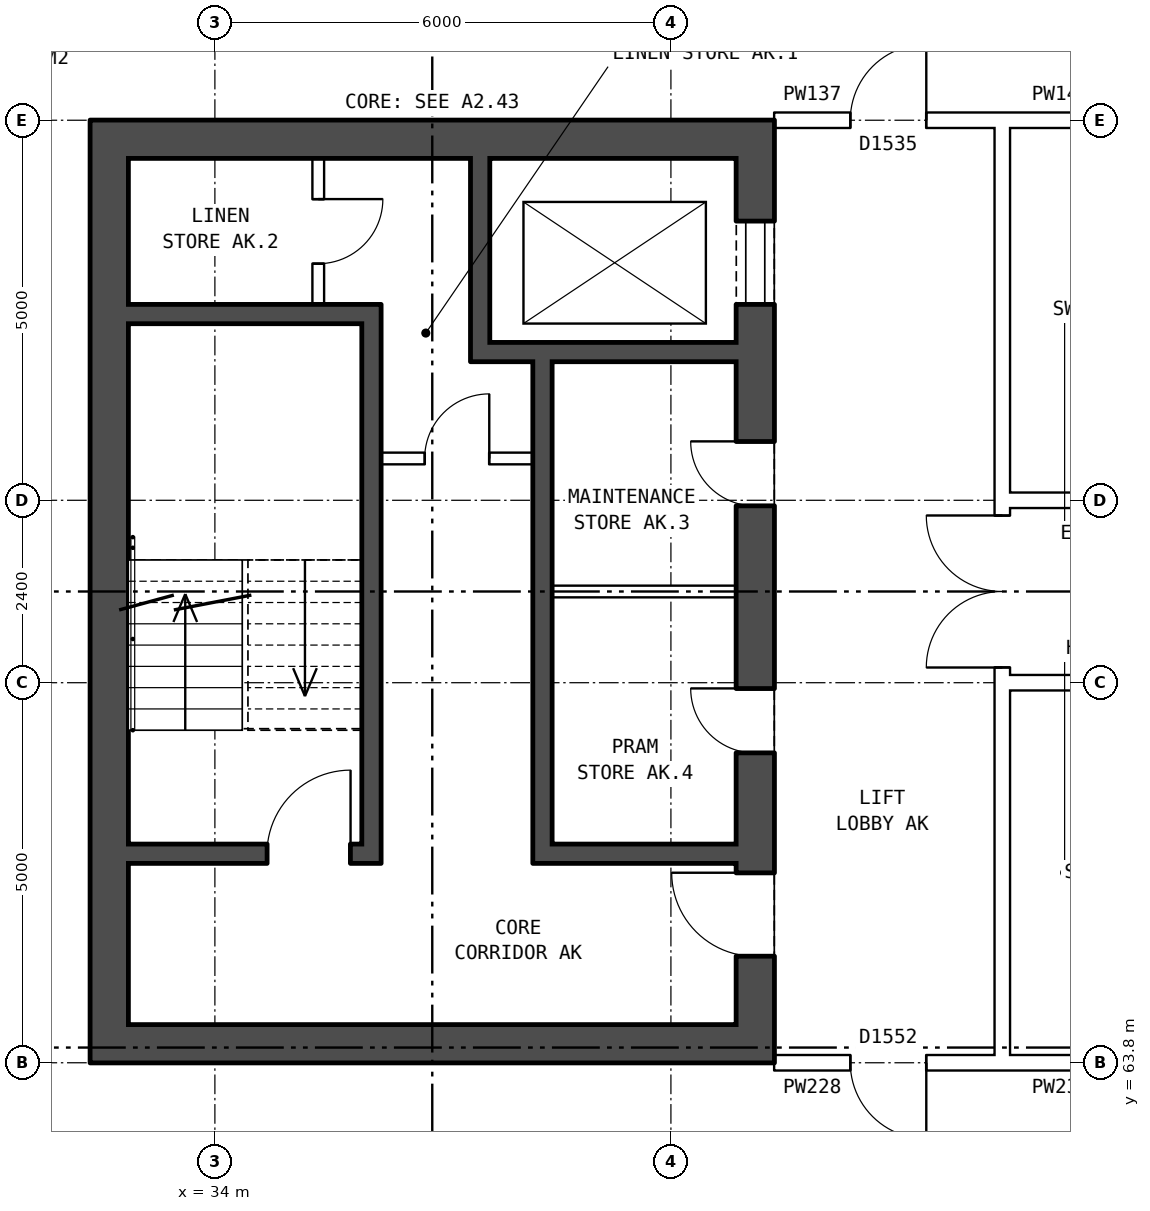
"""IFC4 building model, lengths in metres.
Left out: names, types, materials, properties, quantities, classifications, styles, units other than length and angle.
Written with IfcOpenShell. Run it as: python <this file> out.ifc"""

import sys

from ifc_helpers import new_model, si_unit, direction, frame, frame_2d, origin, place, context, subcontext, project, spatial, rectangle, extrude, element, fill, save


model = new_model("IFC4")
c1 = context("Model", 3, precision=1e-05, world=origin(), true_north=direction((0.0, 1.0)))
c2 = subcontext(c1, "Body", "Model", "MODEL_VIEW")
j1 = project(units=[si_unit("LENGTHUNIT", "METRE"), si_unit("PLANEANGLEUNIT", "RADIAN")], contexts=[c1])
p1 = place(None, origin())
s1 = spatial("IfcSite", under=j1, at=p1, CompositionType="ELEMENT")
p2 = place(p1, origin())
s2 = spatial("IfcBuilding", under=s1, at=p2, CompositionType="ELEMENT")
p3 = place(p2, frame((0.0, 0.0, 151.6)))
s3 = spatial("IfcBuildingStorey", under=s2, at=p3, CompositionType="ELEMENT", Elevation=151.6)
p4 = place(p3, frame((41.11, 76.2, 0.0), z_axis=(0.0, 0.0, 1.0), x_axis=(0.0, -1.0, 0.0)))
e1 = element("IfcWall", 1, at=p4, inside=s3, PredefinedType="SHEAR", context=c2, shape_type="SweptSolid", body=[
    extrude(rectangle(XDim=12.4, YDim=0.5, at=frame_2d((6.2, 0.0))), origin(), (0.0, 0.0, 1.0), 2.85),
])
p5 = place(p4, frame((1.325, 0.0, 0.0)))
e2 = element("IfcOpeningElement", 2, at=p5, cuts=e1, PredefinedType="OPENING", context=c2, shape_type="SweptSolid", body=[
    extrude(rectangle(XDim=1.1, YDim=2.1, at=frame_2d((0.55, 1.05))), frame((0.0, 0.26, 0.0), z_axis=(0.0, -1.0, 0.0), x_axis=(1.0, 0.0, 0.0)), (0.0, 0.0, 1.0), 0.52),
])
p6 = place(p4, frame((4.225, 0.0, 0.0)))
e3 = element("IfcOpeningElement", 3, at=p6, cuts=e1, PredefinedType="OPENING", context=c2, shape_type="SweptSolid", body=[
    extrude(rectangle(XDim=0.85, YDim=2.1, at=frame_2d((0.425, 1.05))), frame((0.0, 0.26, 0.0), z_axis=(0.0, -1.0, 0.0), x_axis=(1.0, 0.0, 0.0)), (0.0, 0.0, 1.0), 0.52),
])
p7 = place(p4, frame((7.475, 0.0, 0.0)))
e4 = element("IfcOpeningElement", 4, at=p7, cuts=e1, PredefinedType="OPENING", context=c2, shape_type="SweptSolid", body=[
    extrude(rectangle(XDim=0.85, YDim=2.1, at=frame_2d((0.425, 1.05))), frame((0.0, 0.26, 0.0), z_axis=(0.0, -1.0, 0.0), x_axis=(1.0, 0.0, 0.0)), (0.0, 0.0, 1.0), 0.52),
])
p8 = place(p4, frame((9.9, 0.0, 0.0)))
e5 = element("IfcOpeningElement", 5, at=p8, cuts=e1, PredefinedType="OPENING", context=c2, shape_type="SweptSolid", body=[
    extrude(rectangle(XDim=1.1, YDim=2.1, at=frame_2d((0.55, 1.05))), frame((0.0, 0.26, 0.0), z_axis=(0.0, -1.0, 0.0), x_axis=(1.0, 0.0, 0.0)), (0.0, 0.0, 1.0), 0.52),
])
p9 = place(p3, frame((32.61, 76.2, 0.0), z_axis=(0.0, 0.0, 1.0), x_axis=(0.0, -1.0, 0.0)))
e6 = element("IfcWall", 6, at=p9, inside=s3, PredefinedType="SHEAR", context=c2, shape_type="SweptSolid", body=[
    extrude(rectangle(XDim=12.4, YDim=0.5, at=frame_2d((6.2, 0.0))), origin(), (0.0, 0.0, 1.0), 2.85),
])
for number, where, z_axis, x_axis in (
    (7, (40.86, 75.95, 0.0), (0.0, 0.0, 1.0), (-1.0, 0.0, 0.0)),
    (8, (40.86, 64.05, 0.0), (0.0, 0.0, 1.0), (-1.0, 0.0, 0.0)),
):
    element("IfcWall", number, at=place(p3, frame(where, z_axis=z_axis, x_axis=x_axis)), inside=s3, PredefinedType="SHEAR", context=c2, shape_type="SweptSolid", body=[
        extrude(rectangle(XDim=8.0, YDim=0.5, at=frame_2d((4.0, 0.0))), origin(), (0.0, 0.0, 1.0), 2.85),
    ])
p10 = place(p3, frame((35.935, 73.65, 0.0), z_axis=(0.0, 0.0, 1.0), x_axis=(-1.0, 0.0, 0.0)))
e9 = element("IfcWall", 9, at=p10, inside=s3, PredefinedType="SHEAR", context=c2, shape_type="SweptSolid", body=[
    extrude(rectangle(XDim=3.075, YDim=0.25, at=frame_2d((1.538, 0.0))), origin(), (0.0, 0.0, 1.0), 2.85),
])
p11 = place(p3, frame((40.86, 73.15, 0.0), z_axis=(0.0, 0.0, 1.0), x_axis=(-1.0, 0.0, 0.0)))
e10 = element("IfcWall", 10, at=p11, inside=s3, PredefinedType="SHEAR", context=c2, shape_type="SweptSolid", body=[
    extrude(rectangle(XDim=3.495, YDim=0.25, at=frame_2d((1.748, 0.0))), origin(), (0.0, 0.0, 1.0), 2.85),
])
p12 = place(p3, frame((38.185, 71.75, 0.0), z_axis=(0.0, 0.0, 1.0), x_axis=(-1.0, 0.0, 0.0)))
e11 = element("IfcWall", 11, at=p12, inside=s3, PredefinedType="PARTITIONING", context=c2, shape_type="SweptSolid", body=[
    extrude(rectangle(XDim=2.0, YDim=0.15, at=frame_2d((1.0, 0.0))), origin(), (0.0, 0.0, 1.0), 2.85),
])
p13 = place(p12, frame((0.575, 0.0, 0.0)))
e12 = element("IfcOpeningElement", 12, at=p13, cuts=e11, PredefinedType="OPENING", context=c2, shape_type="SweptSolid", body=[
    extrude(rectangle(XDim=0.85, YDim=2.1, at=frame_2d((0.425, 1.05))), frame((0.0, 0.085, 0.0), z_axis=(0.0, -1.0, 0.0), x_axis=(1.0, 0.0, 0.0)), (0.0, 0.0, 1.0), 0.17),
])
p14 = place(p3, frame((40.86, 70.0, 0.0), z_axis=(0.0, 0.0, 1.0), x_axis=(-1.0, 0.0, 0.0)))
e13 = element("IfcWall", 13, at=p14, inside=s3, PredefinedType="PARTITIONING", context=c2, shape_type="SweptSolid", body=[
    extrude(rectangle(XDim=2.425, YDim=0.15, at=frame_2d((1.212, 0.0))), origin(), (0.0, 0.0, 1.0), 2.85),
])
p15 = place(p3, frame((40.86, 66.55, 0.0), z_axis=(0.0, 0.0, 1.0), x_axis=(-1.0, 0.0, 0.0)))
e14 = element("IfcWall", 14, at=p15, inside=s3, PredefinedType="SHEAR", context=c2, shape_type="SweptSolid", body=[
    extrude(rectangle(XDim=2.425, YDim=0.25, at=frame_2d((1.212, 0.0))), origin(), (0.0, 0.0, 1.0), 2.85),
])
p16 = place(p3, frame((35.935, 66.55, 0.0), z_axis=(0.0, 0.0, 1.0), x_axis=(-1.0, 0.0, 0.0)))
e15 = element("IfcWall", 15, at=p16, inside=s3, PredefinedType="SHEAR", context=c2, shape_type="SweptSolid", body=[
    extrude(rectangle(XDim=3.075, YDim=0.25, at=frame_2d((1.538, 0.0))), origin(), (0.0, 0.0, 1.0), 2.85),
])
p17 = place(p16, frame((0.15, 0.0, 0.0)))
e16 = element("IfcOpeningElement", 16, at=p17, cuts=e15, PredefinedType="OPENING", context=c2, shape_type="SweptSolid", body=[
    extrude(rectangle(XDim=1.1, YDim=2.1, at=frame_2d((0.55, 1.05))), frame((0.0, 0.135, 0.0), z_axis=(0.0, -1.0, 0.0), x_axis=(1.0, 0.0, 0.0)), (0.0, 0.0, 1.0), 0.27),
])
p18 = place(p3, frame((38.31, 73.025, 0.0), z_axis=(0.0, 0.0, 1.0), x_axis=(0.0, -1.0, 0.0)))
e17 = element("IfcWall", 17, at=p18, inside=s3, PredefinedType="SHEAR", context=c2, shape_type="SweptSolid", body=[
    extrude(rectangle(XDim=6.6, YDim=0.25, at=frame_2d((3.3, 0.0))), origin(), (0.0, 0.0, 1.0), 2.85),
])
p19 = place(p3, frame((37.49, 75.7, 0.0), z_axis=(0.0, 0.0, 1.0), x_axis=(0.0, -1.0, 0.0)))
e18 = element("IfcWall", 18, at=p19, inside=s3, PredefinedType="SHEAR", context=c2, shape_type="SweptSolid", body=[
    extrude(rectangle(XDim=2.425, YDim=0.25, at=frame_2d((1.212, 0.0))), origin(), (0.0, 0.0, 1.0), 2.85),
])
p20 = place(p3, frame((36.06, 73.775, 0.0), z_axis=(0.0, 0.0, 1.0), x_axis=(0.0, -1.0, 0.0)))
e19 = element("IfcWall", 19, at=p20, inside=s3, PredefinedType="SHEAR", context=c2, shape_type="SweptSolid", body=[
    extrude(rectangle(XDim=7.35, YDim=0.25, at=frame_2d((3.675, 0.0))), origin(), (0.0, 0.0, 1.0), 2.85),
])
p21 = place(p3, frame((35.36, 75.7, 0.0), z_axis=(0.0, 0.0, 1.0), x_axis=(0.0, -1.0, 0.0)))
e20 = element("IfcWall", 20, at=p21, inside=s3, PredefinedType="PARTITIONING", context=c2, shape_type="SweptSolid", body=[
    extrude(rectangle(XDim=1.925, YDim=0.15, at=frame_2d((0.962, 0.0))), origin(), (0.0, 0.0, 1.0), 2.85),
])
p22 = place(p21, frame((0.538, 0.0, 0.0)))
e21 = element("IfcOpeningElement", 21, at=p22, cuts=e20, PredefinedType="OPENING", context=c2, shape_type="SweptSolid", body=[
    extrude(rectangle(XDim=0.85, YDim=2.1, at=frame_2d((0.425, 1.05))), frame((0.0, 0.085, 0.0), z_axis=(0.0, -1.0, 0.0), x_axis=(1.0, 0.0, 0.0)), (0.0, 0.0, 1.0), 0.17),
])
p23 = place(p3, frame((44.36, 63.9, 0.0), z_axis=(0.0, 0.0, 1.0), x_axis=(0.0, 1.0, 0.0)))
e22 = element("IfcWall", 22, at=p23, inside=s3, PredefinedType="PARTITIONING", context=c2, shape_type="SweptSolid", body=[
    extrude(rectangle(XDim=12.2, YDim=0.2, at=frame_2d((6.1, 0.0))), origin(), (0.0, 0.0, 1.0), 2.85),
])
p24 = place(p23, frame((5.1, 0.0, 0.0)))
e23 = element("IfcOpeningElement", 23, at=p24, cuts=e22, PredefinedType="OPENING", context=c2, shape_type="SweptSolid", body=[
    extrude(rectangle(XDim=2.0, YDim=2.1, at=frame_2d((1.0, 1.05))), frame((0.0, 0.11, 0.0), z_axis=(0.0, -1.0, 0.0), x_axis=(1.0, 0.0, 0.0)), (0.0, 0.0, 1.0), 0.22),
])
p25 = place(p3, frame((41.36, 63.8, 0.0), z_axis=(0.0, 0.0, 1.0), x_axis=(1.0, 0.0, 0.0)))
e24 = element("IfcWall", 24, at=p25, inside=s3, PredefinedType="PARTITIONING", context=c2, shape_type="SweptSolid", body=[
    extrude(rectangle(XDim=3.0, YDim=0.2, at=frame_2d((1.5, 0.0))), origin(), (0.0, 0.0, 1.0), 2.85),
])
p26 = place(p25, frame((1.0, 0.0, 0.0)))
e25 = element("IfcOpeningElement", 25, at=p26, cuts=e24, PredefinedType="OPENING", context=c2, shape_type="SweptSolid", body=[
    extrude(rectangle(XDim=1.0, YDim=2.1, at=frame_2d((0.5, 1.05))), frame((0.0, 0.11, 0.0), z_axis=(0.0, -1.0, 0.0), x_axis=(1.0, 0.0, 0.0)), (0.0, 0.0, 1.0), 0.22),
])
p27 = place(p3, frame((44.36, 63.8, 0.0), z_axis=(0.0, 0.0, 1.0), x_axis=(1.0, 0.0, 0.0)))
e26 = element("IfcWall", 26, at=p27, inside=s3, PredefinedType="PARTITIONING", context=c2, shape_type="SweptSolid", body=[
    extrude(rectangle(XDim=1.54, YDim=0.2, at=frame_2d((0.77, 0.0))), origin(), (0.0, 0.0, 1.0), 2.85),
])
p28 = place(p3, frame((44.36, 68.8, 0.0), z_axis=(0.0, 0.0, 1.0), x_axis=(1.0, 0.0, 0.0)))
e27 = element("IfcWall", 27, at=p28, inside=s3, PredefinedType="PARTITIONING", context=c2, shape_type="SweptSolid", body=[
    extrude(rectangle(XDim=19.28, YDim=0.2, at=frame_2d((9.64, 0.0))), origin(), (0.0, 0.0, 1.0), 2.85),
])
p29 = place(p28, frame((14.64, 0.0, 0.0)))
e28 = element("IfcOpeningElement", 28, at=p29, cuts=e27, PredefinedType="OPENING", context=c2, shape_type="SweptSolid", body=[
    extrude(rectangle(XDim=1.0, YDim=2.1, at=frame_2d((0.5, 1.05))), frame((0.0, 0.11, 0.0), z_axis=(0.0, -1.0, 0.0), x_axis=(1.0, 0.0, 0.0)), (0.0, 0.0, 1.0), 0.22),
])
p30 = place(p28, frame((5.64, 0.0, 0.0)))
e29 = element("IfcOpeningElement", 29, at=p30, cuts=e27, PredefinedType="OPENING", context=c2, shape_type="SweptSolid", body=[
    extrude(rectangle(XDim=1.0, YDim=2.1, at=frame_2d((0.5, 1.05))), frame((0.0, 0.11, 0.0), z_axis=(0.0, -1.0, 0.0), x_axis=(1.0, 0.0, 0.0)), (0.0, 0.0, 1.0), 0.22),
])
p31 = place(p3, frame((44.36, 71.2, 0.0), z_axis=(0.0, 0.0, 1.0), x_axis=(1.0, 0.0, 0.0)))
e30 = element("IfcWall", 30, at=p31, inside=s3, PredefinedType="PARTITIONING", context=c2, shape_type="SweptSolid", body=[
    extrude(rectangle(XDim=19.28, YDim=0.2, at=frame_2d((9.64, 0.0))), origin(), (0.0, 0.0, 1.0), 2.85),
])
p32 = place(p31, frame((14.64, 0.0, 0.0)))
e31 = element("IfcOpeningElement", 31, at=p32, cuts=e30, PredefinedType="OPENING", context=c2, shape_type="SweptSolid", body=[
    extrude(rectangle(XDim=1.0, YDim=2.1, at=frame_2d((0.5, 1.05))), frame((0.0, 0.11, 0.0), z_axis=(0.0, -1.0, 0.0), x_axis=(1.0, 0.0, 0.0)), (0.0, 0.0, 1.0), 0.22),
])
p33 = place(p31, frame((5.64, 0.0, 0.0)))
e32 = element("IfcOpeningElement", 32, at=p33, cuts=e30, PredefinedType="OPENING", context=c2, shape_type="SweptSolid", body=[
    extrude(rectangle(XDim=1.0, YDim=2.1, at=frame_2d((0.5, 1.05))), frame((0.0, 0.11, 0.0), z_axis=(0.0, -1.0, 0.0), x_axis=(1.0, 0.0, 0.0)), (0.0, 0.0, 1.0), 0.22),
])
p34 = place(p3, frame((41.36, 76.2, 0.0), z_axis=(0.0, 0.0, 1.0), x_axis=(1.0, 0.0, 0.0)))
e33 = element("IfcWall", 33, at=p34, inside=s3, PredefinedType="PARTITIONING", context=c2, shape_type="SweptSolid", body=[
    extrude(rectangle(XDim=3.0, YDim=0.2, at=frame_2d((1.5, 0.0))), origin(), (0.0, 0.0, 1.0), 2.85),
])
p35 = place(p34, frame((1.0, 0.0, 0.0)))
e34 = element("IfcOpeningElement", 34, at=p35, cuts=e33, PredefinedType="OPENING", context=c2, shape_type="SweptSolid", body=[
    extrude(rectangle(XDim=1.0, YDim=2.1, at=frame_2d((0.5, 1.05))), frame((0.0, 0.11, 0.0), z_axis=(0.0, -1.0, 0.0), x_axis=(1.0, 0.0, 0.0)), (0.0, 0.0, 1.0), 0.22),
])
p36 = place(p3, frame((44.36, 76.2, 0.0), z_axis=(0.0, 0.0, 1.0), x_axis=(1.0, 0.0, 0.0)))
e35 = element("IfcWall", 35, at=p36, inside=s3, PredefinedType="PARTITIONING", context=c2, shape_type="SweptSolid", body=[
    extrude(rectangle(XDim=1.54, YDim=0.2, at=frame_2d((0.77, 0.0))), origin(), (0.0, 0.0, 1.0), 2.85),
])
p37 = place(p5, origin())
e36 = element("IfcDoor", 36, at=p37, inside=s3, OperationType="DOUBLE_DOOR_SLIDING", PredefinedType="DOOR", context=c2, shape_type="SweptSolid", body=[
    extrude(rectangle(XDim=1.1, YDim=2.1, at=frame_2d((0.55, 1.05))), frame((0.0, -0.185, 0.0), z_axis=(0.0, -1.0, 0.0), x_axis=(1.0, 0.0, 0.0)), (0.0, 0.0, 1.0), 0.05),
])
fill(e2, e36)
p38 = place(p6, frame((0.85, 0.0, 0.0), z_axis=(0.0, 0.0, 1.0), x_axis=(-1.0, 0.0, 0.0)))
e37 = element("IfcDoor", 37, at=p38, inside=s3, OperationType="SINGLE_SWING_RIGHT", PredefinedType="DOOR", context=c2, shape_type="SweptSolid", body=[
    extrude(rectangle(XDim=0.85, YDim=2.1, at=frame_2d((0.425, 1.05))), frame((0.0, 0.235, 0.0), z_axis=(0.0, -1.0, 0.0), x_axis=(1.0, 0.0, 0.0)), (0.0, 0.0, 1.0), 0.05),
])
fill(e3, e37)
p39 = place(p7, frame((0.85, 0.0, 0.0), z_axis=(0.0, 0.0, 1.0), x_axis=(-1.0, 0.0, 0.0)))
e38 = element("IfcDoor", 38, at=p39, inside=s3, OperationType="SINGLE_SWING_RIGHT", PredefinedType="DOOR", context=c2, shape_type="SweptSolid", body=[
    extrude(rectangle(XDim=0.85, YDim=2.1, at=frame_2d((0.425, 1.05))), frame((0.0, 0.235, 0.0), z_axis=(0.0, -1.0, 0.0), x_axis=(1.0, 0.0, 0.0)), (0.0, 0.0, 1.0), 0.05),
])
fill(e4, e38)
p40 = place(p8, frame((1.1, 0.0, 0.0), z_axis=(0.0, 0.0, 1.0), x_axis=(-1.0, 0.0, 0.0)))
e39 = element("IfcDoor", 39, at=p40, inside=s3, OperationType="SINGLE_SWING_RIGHT", PredefinedType="DOOR", context=c2, shape_type="SweptSolid", body=[
    extrude(rectangle(XDim=1.1, YDim=2.1, at=frame_2d((0.55, 1.05))), frame((0.0, 0.235, 0.0), z_axis=(0.0, -1.0, 0.0), x_axis=(1.0, 0.0, 0.0)), (0.0, 0.0, 1.0), 0.05),
])
fill(e5, e39)
p41 = place(p17, frame((1.1, 0.0, 0.0), z_axis=(0.0, 0.0, 1.0), x_axis=(-1.0, 0.0, 0.0)))
e40 = element("IfcDoor", 40, at=p41, inside=s3, OperationType="SINGLE_SWING_RIGHT", PredefinedType="DOOR", context=c2, shape_type="SweptSolid", body=[
    extrude(rectangle(XDim=1.1, YDim=2.1, at=frame_2d((0.55, 1.05))), frame((0.0, 0.025, 0.0), z_axis=(0.0, -1.0, 0.0), x_axis=(1.0, 0.0, 0.0)), (0.0, 0.0, 1.0), 0.05),
])
fill(e16, e40)
p42 = place(p13, frame((0.85, 0.0, 0.0), z_axis=(0.0, 0.0, 1.0), x_axis=(-1.0, 0.0, 0.0)))
e41 = element("IfcDoor", 41, at=p42, inside=s3, OperationType="SINGLE_SWING_RIGHT", PredefinedType="DOOR", context=c2, shape_type="SweptSolid", body=[
    extrude(rectangle(XDim=0.85, YDim=2.1, at=frame_2d((0.425, 1.05))), frame((0.0, 0.025, 0.0), z_axis=(0.0, -1.0, 0.0), x_axis=(1.0, 0.0, 0.0)), (0.0, 0.0, 1.0), 0.05),
])
fill(e12, e41)
p43 = place(p22, origin())
e42 = element("IfcDoor", 42, at=p43, inside=s3, OperationType="SINGLE_SWING_LEFT", PredefinedType="DOOR", context=c2, shape_type="SweptSolid", body=[
    extrude(rectangle(XDim=0.85, YDim=2.1, at=frame_2d((0.425, 1.05))), frame((0.0, 0.025, 0.0), z_axis=(0.0, -1.0, 0.0), x_axis=(1.0, 0.0, 0.0)), (0.0, 0.0, 1.0), 0.05),
])
fill(e21, e42)
p44 = place(p24, origin())
e43 = element("IfcDoor", 43, at=p44, inside=s3, OperationType="DOUBLE_DOOR_SINGLE_SWING", PredefinedType="DOOR", context=c2, shape_type="SweptSolid", body=[
    extrude(rectangle(XDim=2.0, YDim=2.1, at=frame_2d((1.0, 1.05))), frame((0.0, 0.025, 0.0), z_axis=(0.0, -1.0, 0.0), x_axis=(1.0, 0.0, 0.0)), (0.0, 0.0, 1.0), 0.05),
])
fill(e23, e43)
p45 = place(p26, frame((1.0, 0.0, 0.0), z_axis=(0.0, 0.0, 1.0), x_axis=(-1.0, 0.0, 0.0)))
e44 = element("IfcDoor", 44, at=p45, inside=s3, OperationType="SINGLE_SWING_LEFT", PredefinedType="DOOR", context=c2, shape_type="SweptSolid", body=[
    extrude(rectangle(XDim=1.0, YDim=2.1, at=frame_2d((0.5, 1.05))), frame((0.0, 0.025, 0.0), z_axis=(0.0, -1.0, 0.0), x_axis=(1.0, 0.0, 0.0)), (0.0, 0.0, 1.0), 0.05),
])
fill(e25, e44)
p46 = place(p35, origin())
e45 = element("IfcDoor", 45, at=p46, inside=s3, OperationType="SINGLE_SWING_RIGHT", PredefinedType="DOOR", context=c2, shape_type="SweptSolid", body=[
    extrude(rectangle(XDim=1.0, YDim=2.1, at=frame_2d((0.5, 1.05))), frame((0.0, 0.025, 0.0), z_axis=(0.0, -1.0, 0.0), x_axis=(1.0, 0.0, 0.0)), (0.0, 0.0, 1.0), 0.05),
])
fill(e34, e45)
save(model, sys.argv[1])
